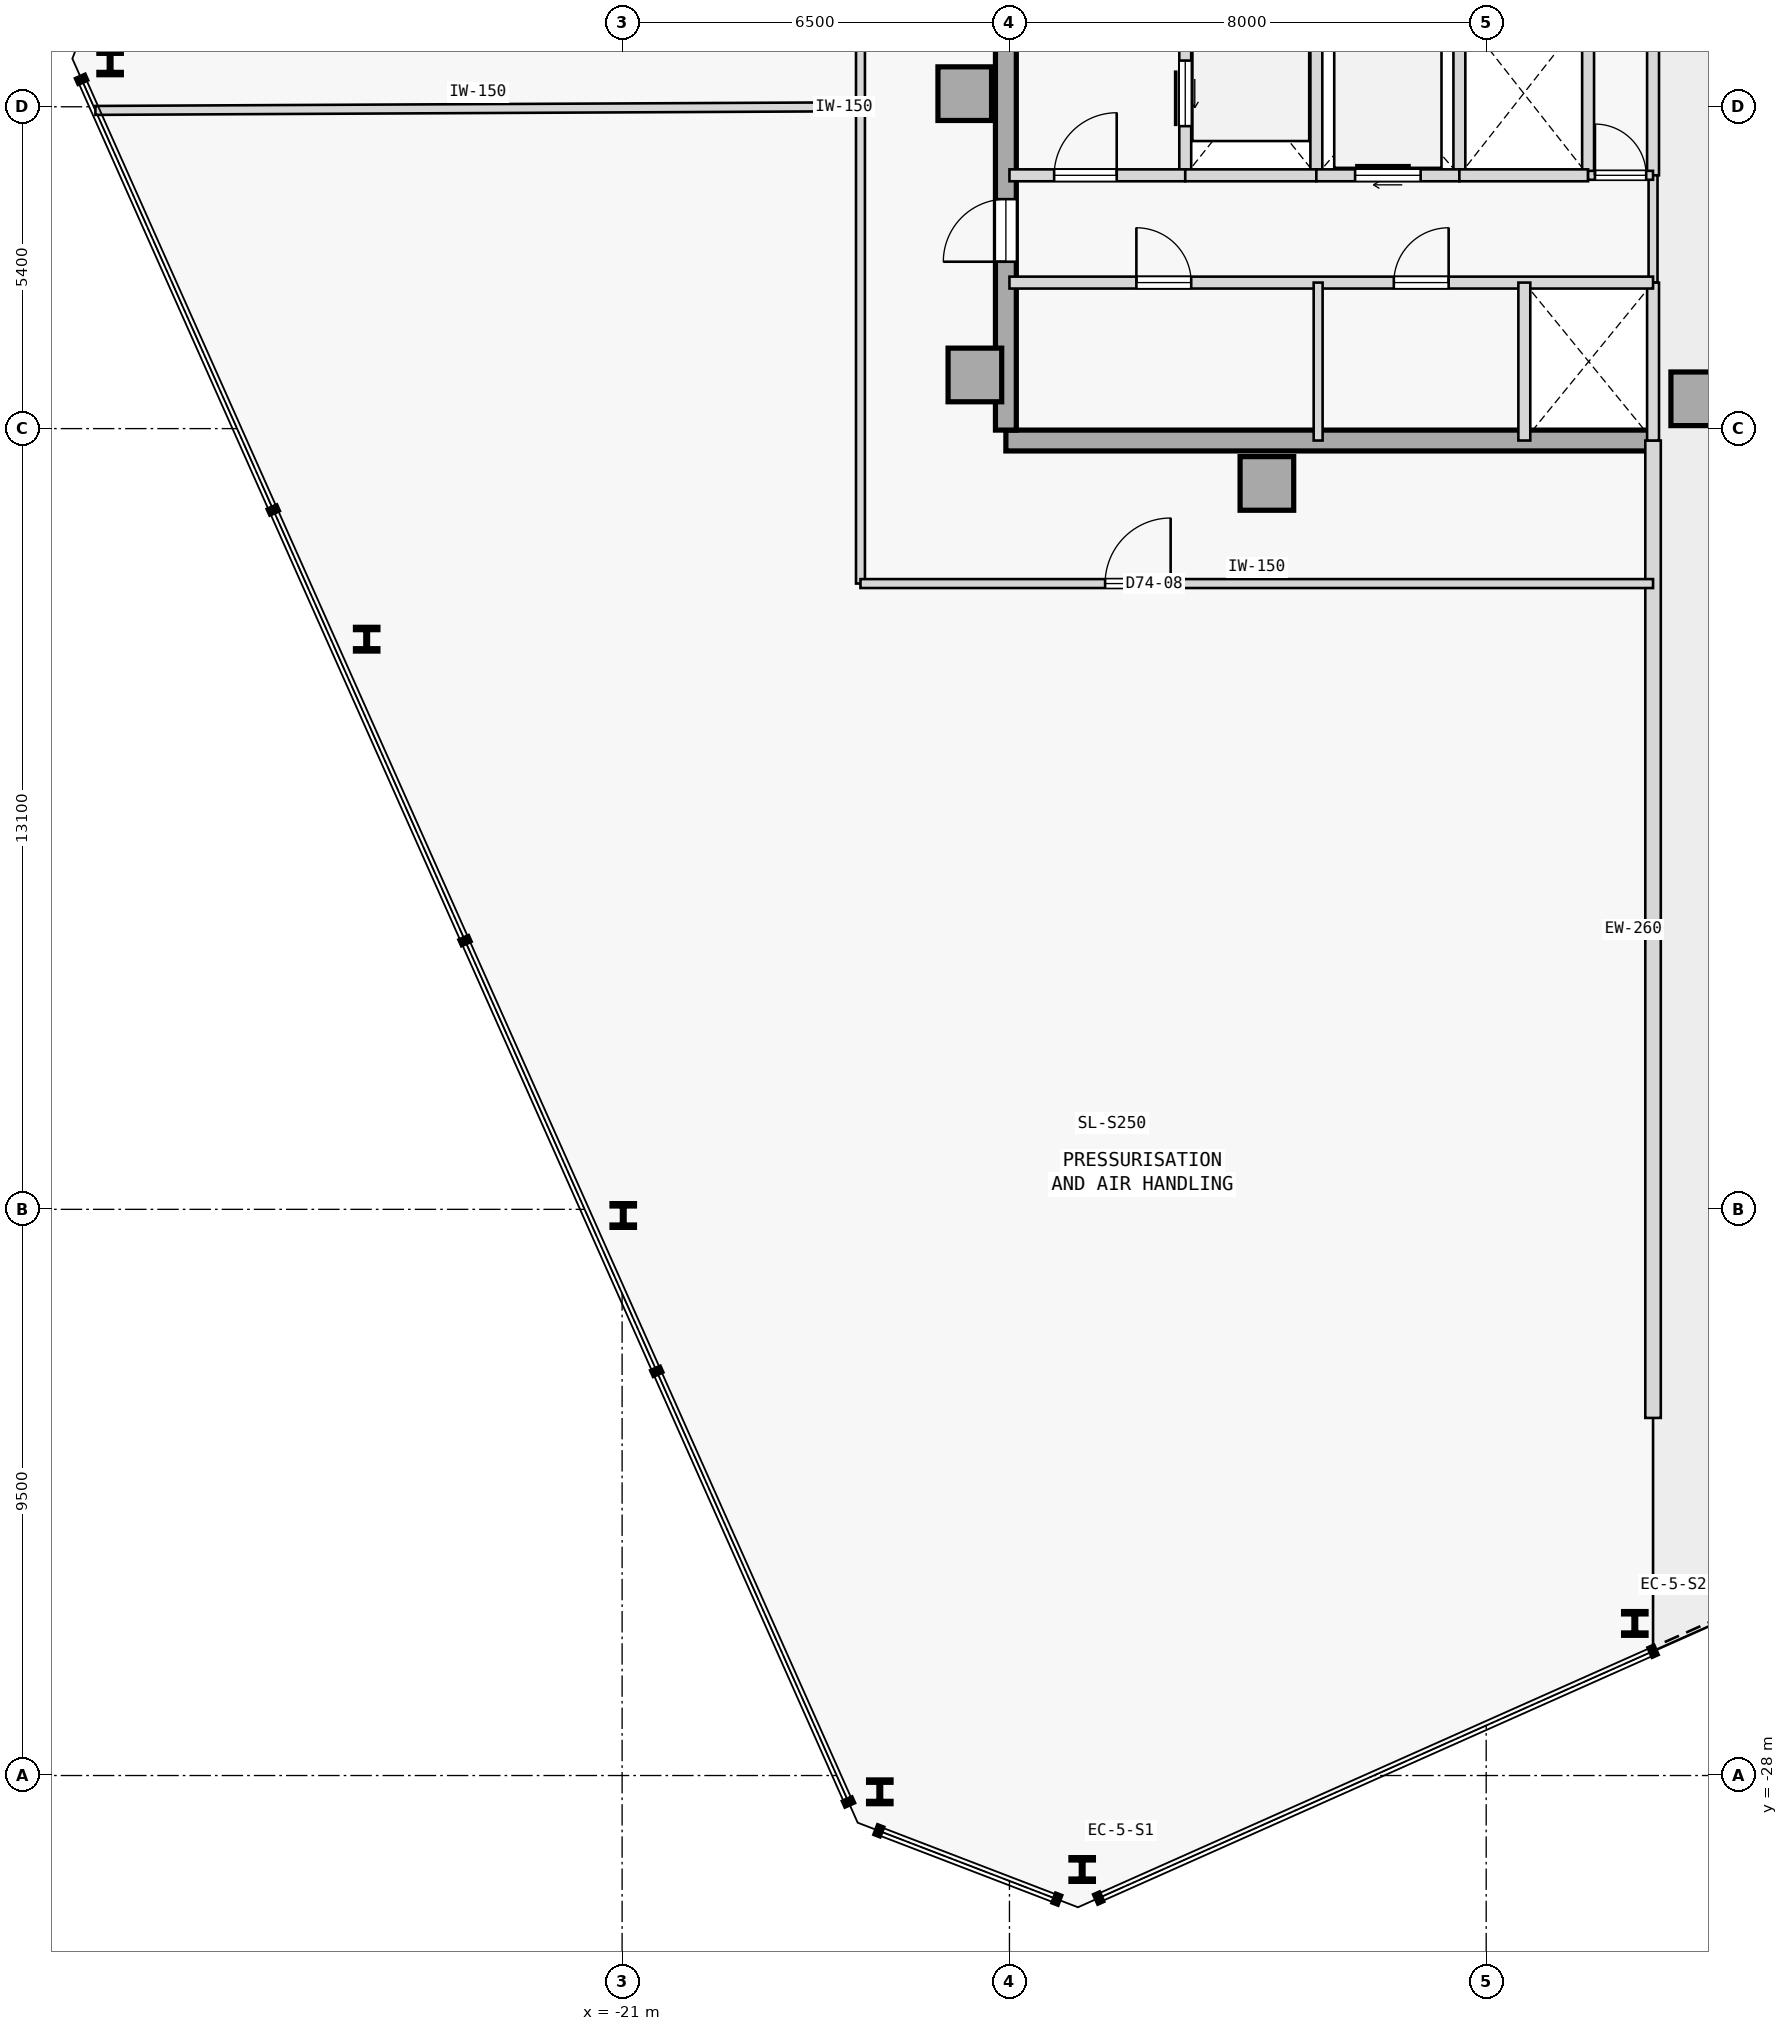
"""IFC4 building model, lengths in metres.
Left out: names, types, materials, properties, quantities, classifications, styles, units other than length and angle.
Written with IfcOpenShell. Run it as: python <this file> out.ifc"""

import sys

from ifc_helpers import new_model, si_unit, direction, frame, frame_2d, origin, origin_2d, place, context, subcontext, project, spatial, rectangle, i_section, extrude, element, fill, save


model = new_model("IFC4")
c1 = context("Model", 3, precision=1e-05, world=origin(), true_north=direction((0.0, 1.0)))
c2 = subcontext(c1, "Body", "Model", "MODEL_VIEW")
j1 = project(units=[si_unit("LENGTHUNIT", "METRE"), si_unit("PLANEANGLEUNIT", "RADIAN")], contexts=[c1])
p1 = place(None, origin())
s1 = spatial("IfcSite", under=j1, at=p1, CompositionType="ELEMENT")
p2 = place(p1, origin())
s2 = spatial("IfcBuilding", under=s1, at=p2, CompositionType="ELEMENT")
p3 = place(p2, frame((0.0, 0.0, 275.6)))
s3 = spatial("IfcBuildingStorey", under=s2, at=p3, CompositionType="ELEMENT", Elevation=275.6)
for number, where, z_axis, x_axis in (
    (1, (-15.25, 0.22, 0.0), (0.0, 0.0, 1.0), (1.0, 0.0, 0.0)),
    (2, (-15.08, -4.5, 0.0), (0.0, 0.0, 1.0), (1.0, 0.0, 0.0)),
    (3, (-10.18, -6.32, 0.0), (0.0, 0.0, 1.0), (1.0, 0.0, 0.0)),
    (4, (-2.95, -4.9, 0.0), (0.0, 0.0, 1.0), (1.0, 0.0, 0.0)),
):
    element("IfcColumn", number, at=place(p3, frame(where, z_axis=z_axis, x_axis=x_axis)), inside=s3, PredefinedType="COLUMN", context=c2, shape_type="SweptSolid", body=[
        extrude(rectangle(XDim=0.9, YDim=0.9, at=origin_2d()), origin(), (0.0, 0.0, 1.0), 6.3),
    ])
p4 = place(p3, frame((-14.56, -5.6, 0.0), z_axis=(0.0, 0.0, 1.0), x_axis=(1.0, 0.0, 0.0)))
e5 = element("IfcWall", 5, at=p4, inside=s3, PredefinedType="SHEAR", context=c2, shape_type="SweptSolid", body=[
    extrude(rectangle(XDim=10.86, YDim=0.35, at=frame_2d((5.43, 0.0))), origin(), (0.0, 0.0, 1.0), 6.075),
])
p5 = place(p3, frame((-14.56, -5.425, 0.0), z_axis=(0.0, 0.0, 1.0), x_axis=(0.0, 1.0, 0.0)))
e6 = element("IfcWall", 6, at=p5, inside=s3, PredefinedType="SHEAR", context=c2, shape_type="SweptSolid", body=[
    extrude(rectangle(XDim=10.85, YDim=0.35, at=frame_2d((5.425, 0.0))), origin(), (0.0, 0.0, 1.0), 6.075),
])
p6 = place(p5, frame((2.825, 0.0, 0.0)))
e7 = element("IfcOpeningElement", 7, at=p6, cuts=e6, PredefinedType="OPENING", context=c2, shape_type="SweptSolid", body=[
    extrude(rectangle(XDim=1.05, YDim=2.15, at=frame_2d((0.525, 1.075))), frame((0.0, 0.185, 0.0), z_axis=(0.0, -1.0, 0.0), x_axis=(1.0, 0.0, 0.0)), (0.0, 0.0, 1.0), 0.37),
])
for number, where, z_axis, x_axis in (
    (8, (-13.28, -29.577, 0.0), (0.0, 0.0, 1.0), (1.0, 0.0, 0.0)),
    (9, (-4.006, -25.448, 0.0), (0.0, 0.0, 1.0), (1.0, 0.0, 0.0)),
    (10, (-29.592, 0.737, 0.0), (0.0, 0.0, 1.0), (1.0, 0.0, 0.0)),
    (11, (-25.286, -8.933, 0.0), (0.0, 0.0, 1.0), (1.0, 0.0, 0.0)),
    (12, (-20.981, -18.603, 0.0), (0.0, 0.0, 1.0), (1.0, 0.0, 0.0)),
    (13, (-16.676, -28.273, 0.0), (0.0, 0.0, 1.0), (1.0, 0.0, 0.0)),
):
    element("IfcColumn", number, at=place(p3, frame(where, z_axis=z_axis, x_axis=x_axis)), inside=s3, PredefinedType="COLUMN", context=c2, shape_type="SweptSolid", body=[
        extrude(i_section(OverallWidth=0.377, OverallDepth=0.399, WebThickness=0.025, FlangeThickness=0.04, FilletRadius=0.015, at=origin_2d()), origin(), (0.0, 0.0, 1.0), 6.3),
    ])
p7 = place(p3, frame((-3.7, -22.0, 0.0), z_axis=(0.0, 0.0, 1.0), x_axis=(0.0, 1.0, 0.0)))
e14 = element("IfcWall", 14, at=p7, inside=s3, PredefinedType="STANDARD", context=c2, shape_type="SweptSolid", body=[
    extrude(rectangle(XDim=16.4, YDim=0.26, at=frame_2d((8.2, 0.0))), origin(), (0.0, 0.0, 1.0), 6.075),
])
p8 = place(p3, frame((-3.7, -1.15, 0.0), z_axis=(0.0, 0.0, 1.0), x_axis=(0.0, 1.0, 0.0)))
e15 = element("IfcWall", 15, at=p8, inside=s3, PredefinedType="STANDARD", context=c2, shape_type="SweptSolid", body=[
    extrude(rectangle(XDim=6.75, YDim=0.2, at=frame_2d((3.375, 0.0))), origin(), (0.0, 0.0, 1.0), 6.075),
])
p9 = place(p3, frame((-3.7, -2.95, 0.0), z_axis=(0.0, 0.0, 1.0), x_axis=(0.0, 1.0, 0.0)))
e16 = element("IfcWall", 16, at=p9, inside=s3, PredefinedType="PARTITIONING", context=c2, shape_type="SweptSolid", body=[
    extrude(rectangle(XDim=1.8, YDim=0.15, at=frame_2d((0.9, 0.0))), origin(), (0.0, 0.0, 1.0), 6.075),
])
p10 = place(p3, frame((-3.7, -5.6, 0.0), z_axis=(0.0, 0.0, 1.0), x_axis=(0.0, 1.0, 0.0)))
e17 = element("IfcWall", 17, at=p10, inside=s3, PredefinedType="STANDARD", context=c2, shape_type="SweptSolid", body=[
    extrude(rectangle(XDim=2.65, YDim=0.2, at=frame_2d((1.325, 0.0))), origin(), (0.0, 0.0, 1.0), 6.075),
])
p11 = place(p3, frame((-11.55, -1.15, 0.0), z_axis=(0.0, 0.0, 1.0), x_axis=(0.0, 1.0, 0.0)))
e18 = element("IfcWall", 18, at=p11, inside=s3, PredefinedType="STANDARD", context=c2, shape_type="SweptSolid", body=[
    extrude(rectangle(XDim=2.75, YDim=0.2, at=frame_2d((1.375, 0.0))), origin(), (0.0, 0.0, 1.0), 6.075),
])
p12 = place(p11, frame((0.825, 0.0, 0.0)))
e19 = element("IfcOpeningElement", 19, at=p12, cuts=e18, PredefinedType="OPENING", context=c2, shape_type="SweptSolid", body=[
    extrude(rectangle(XDim=1.1, YDim=2.15, at=frame_2d((0.55, 1.075))), frame((0.0, 0.11, 0.0), z_axis=(0.0, -1.0, 0.0), x_axis=(1.0, 0.0, 0.0)), (0.0, 0.0, 1.0), 0.22),
])
p13 = place(p3, frame((-9.35, -1.15, 0.0), z_axis=(0.0, 0.0, 1.0), x_axis=(0.0, 1.0, 0.0)))
e20 = element("IfcWall", 20, at=p13, inside=s3, PredefinedType="STANDARD", context=c2, shape_type="SweptSolid", body=[
    extrude(rectangle(XDim=2.75, YDim=0.2, at=frame_2d((1.375, 0.0))), origin(), (0.0, 0.0, 1.0), 6.075),
])
p14 = place(p3, frame((-14.5, -1.15, 0.0), z_axis=(0.0, 0.0, 1.0), x_axis=(1.0, 0.0, 0.0)))
e21 = element("IfcWall", 21, at=p14, inside=s3, PredefinedType="STANDARD", context=c2, shape_type="SweptSolid", body=[
    extrude(rectangle(XDim=2.95, YDim=0.2, at=frame_2d((1.475, 0.0))), origin(), (0.0, 0.0, 1.0), 6.075),
])
p15 = place(p14, frame((0.75, 0.0, 0.0)))
e22 = element("IfcOpeningElement", 22, at=p15, cuts=e21, PredefinedType="OPENING", context=c2, shape_type="SweptSolid", body=[
    extrude(rectangle(XDim=1.05, YDim=2.18, at=frame_2d((0.525, 1.09))), frame((0.0, 0.11, 0.0), z_axis=(0.0, -1.0, 0.0), x_axis=(1.0, 0.0, 0.0)), (0.0, 0.0, 1.0), 0.22),
])
p16 = place(p3, frame((-11.55, -1.15, 0.0), z_axis=(0.0, 0.0, 1.0), x_axis=(1.0, 0.0, 0.0)))
e23 = element("IfcWall", 23, at=p16, inside=s3, PredefinedType="STANDARD", context=c2, shape_type="SweptSolid", body=[
    extrude(rectangle(XDim=2.2, YDim=0.2, at=frame_2d((1.1, 0.0))), origin(), (0.0, 0.0, 1.0), 6.075),
])
p17 = place(p3, frame((-6.95, -1.15, 0.0), z_axis=(0.0, 0.0, 1.0), x_axis=(0.0, 1.0, 0.0)))
e24 = element("IfcWall", 24, at=p17, inside=s3, PredefinedType="STANDARD", context=c2, shape_type="SweptSolid", body=[
    extrude(rectangle(XDim=2.75, YDim=0.2, at=frame_2d((1.375, 0.0))), origin(), (0.0, 0.0, 1.0), 6.075),
])
p18 = place(p3, frame((-9.35, -1.15, 0.0), z_axis=(0.0, 0.0, 1.0), x_axis=(1.0, 0.0, 0.0)))
e25 = element("IfcWall", 25, at=p18, inside=s3, PredefinedType="STANDARD", context=c2, shape_type="SweptSolid", body=[
    extrude(rectangle(XDim=2.4, YDim=0.2, at=frame_2d((1.2, 0.0))), origin(), (0.0, 0.0, 1.0), 6.075),
])
p19 = place(p18, frame((0.65, 0.0, 0.0)))
e26 = element("IfcOpeningElement", 26, at=p19, cuts=e25, PredefinedType="OPENING", context=c2, shape_type="SweptSolid", body=[
    extrude(rectangle(XDim=1.1, YDim=2.15, at=frame_2d((0.55, 1.075))), frame((0.0, 0.11, 0.0), z_axis=(0.0, -1.0, 0.0), x_axis=(1.0, 0.0, 0.0)), (0.0, 0.0, 1.0), 0.22),
])
p20 = place(p3, frame((-4.79, -1.15, 0.0), z_axis=(0.0, 0.0, 1.0), x_axis=(0.0, 1.0, 0.0)))
e27 = element("IfcWall", 27, at=p20, inside=s3, PredefinedType="STANDARD", context=c2, shape_type="SweptSolid", body=[
    extrude(rectangle(XDim=2.75, YDim=0.2, at=frame_2d((1.375, 0.0))), origin(), (0.0, 0.0, 1.0), 6.075),
])
p21 = place(p3, frame((-6.95, -1.15, 0.0), z_axis=(0.0, 0.0, 1.0), x_axis=(1.0, 0.0, 0.0)))
e28 = element("IfcWall", 28, at=p21, inside=s3, PredefinedType="STANDARD", context=c2, shape_type="SweptSolid", body=[
    extrude(rectangle(XDim=2.16, YDim=0.2, at=frame_2d((1.08, 0.0))), origin(), (0.0, 0.0, 1.0), 6.075),
])
p22 = place(p3, frame((-4.79, -1.15, 0.0), z_axis=(0.0, 0.0, 1.0), x_axis=(1.0, 0.0, 0.0)))
e29 = element("IfcWall", 29, at=p22, inside=s3, PredefinedType="PARTITIONING", context=c2, shape_type="SweptSolid", body=[
    extrude(rectangle(XDim=1.09, YDim=0.15, at=frame_2d((0.545, 0.0))), origin(), (0.0, 0.0, 1.0), 6.075),
])
p23 = place(p22, frame((0.115, 0.0, 0.0)))
e30 = element("IfcOpeningElement", 30, at=p23, cuts=e29, PredefinedType="OPENING", context=c2, shape_type="SweptSolid", body=[
    extrude(rectangle(XDim=0.86, YDim=2.15, at=frame_2d((0.43, 1.075))), frame((0.0, 0.085, 0.0), z_axis=(0.0, -1.0, 0.0), x_axis=(1.0, 0.0, 0.0)), (0.0, 0.0, 1.0), 0.17),
])
p24 = place(p3, frame((-14.5, -2.95, 0.0), z_axis=(0.0, 0.0, 1.0), x_axis=(1.0, 0.0, 0.0)))
e31 = element("IfcWall", 31, at=p24, inside=s3, PredefinedType="STANDARD", context=c2, shape_type="SweptSolid", body=[
    extrude(rectangle(XDim=10.8, YDim=0.2, at=frame_2d((5.4, 0.0))), origin(), (0.0, 0.0, 1.0), 6.075),
])
p25 = place(p24, frame((2.13, 0.0, 0.0)))
e32 = element("IfcOpeningElement", 32, at=p25, cuts=e31, PredefinedType="OPENING", context=c2, shape_type="SweptSolid", body=[
    extrude(rectangle(XDim=0.92, YDim=2.15, at=frame_2d((0.46, 1.075))), frame((0.0, 0.11, 0.0), z_axis=(0.0, -1.0, 0.0), x_axis=(1.0, 0.0, 0.0)), (0.0, 0.0, 1.0), 0.22),
])
p26 = place(p24, frame((6.45, 0.0, 0.0)))
e33 = element("IfcOpeningElement", 33, at=p26, cuts=e31, PredefinedType="OPENING", context=c2, shape_type="SweptSolid", body=[
    extrude(rectangle(XDim=0.92, YDim=2.15, at=frame_2d((0.46, 1.075))), frame((0.0, 0.11, 0.0), z_axis=(0.0, -1.0, 0.0), x_axis=(1.0, 0.0, 0.0)), (0.0, 0.0, 1.0), 0.22),
])
p27 = place(p3, frame((-5.86, -5.6, 0.0), z_axis=(0.0, 0.0, 1.0), x_axis=(0.0, 1.0, 0.0)))
e34 = element("IfcWall", 34, at=p27, inside=s3, PredefinedType="STANDARD", context=c2, shape_type="SweptSolid", body=[
    extrude(rectangle(XDim=2.65, YDim=0.2, at=frame_2d((1.325, 0.0))), origin(), (0.0, 0.0, 1.0), 6.075),
])
p28 = place(p3, frame((-9.32, -5.6, 0.0), z_axis=(0.0, 0.0, 1.0), x_axis=(0.0, 1.0, 0.0)))
e35 = element("IfcWall", 35, at=p28, inside=s3, PredefinedType="PARTITIONING", context=c2, shape_type="SweptSolid", body=[
    extrude(rectangle(XDim=2.65, YDim=0.15, at=frame_2d((1.325, 0.0))), origin(), (0.0, 0.0, 1.0), 6.075),
])
for number, where, z_axis, x_axis in (
    (36, (-17.0, 0.0, 0.0), (0.0, 0.0, 1.0), (0.0, 1.0, 0.0)),
    (37, (-17.0, -8.0, 0.0), (0.0, 0.0, 1.0), (0.0, 1.0, 0.0)),
):
    element("IfcWall", number, at=place(p3, frame(where, z_axis=z_axis, x_axis=x_axis)), inside=s3, PredefinedType="PARTITIONING", context=c2, shape_type="SweptSolid", body=[
        extrude(rectangle(XDim=8.0, YDim=0.15, at=frame_2d((4.0, 0.0))), origin(), (0.0, 0.0, 1.0), 6.075),
    ])
p29 = place(p3, frame((-17.0, -8.0, 0.0), z_axis=(0.0, 0.0, 1.0), x_axis=(1.0, 0.0, 0.0)))
e38 = element("IfcWall", 38, at=p29, inside=s3, PredefinedType="PARTITIONING", context=c2, shape_type="SweptSolid", body=[
    extrude(rectangle(XDim=13.3, YDim=0.15, at=frame_2d((6.65, 0.0))), origin(), (0.0, 0.0, 1.0), 6.075),
])
p30 = place(p29, frame((4.105, 0.0, 0.0)))
e39 = element("IfcOpeningElement", 39, at=p30, cuts=e38, PredefinedType="OPENING", context=c2, shape_type="SweptSolid", body=[
    extrude(rectangle(XDim=1.1, YDim=2.15, at=frame_2d((0.55, 1.075))), frame((0.0, 0.085, 0.0), z_axis=(0.0, -1.0, 0.0), x_axis=(1.0, 0.0, 0.0)), (0.0, 0.0, 1.0), 0.17),
])
p31 = place(p3, frame((-29.838, -0.061, 0.0), z_axis=(0.0, 0.0, 1.0), x_axis=(0.999988608793, 0.004773079162, 0.0)))
e40 = element("IfcWall", 40, at=p31, inside=s3, PredefinedType="PARTITIONING", context=c2, shape_type="SweptSolid", body=[
    extrude(rectangle(XDim=12.839, YDim=0.15, at=frame_2d((6.419, 0.0))), origin(), (0.0, 0.0, 1.0), 6.075),
])
p32 = place(p15, origin())
e41 = element("IfcDoor", 41, at=p32, inside=s3, OperationType="SINGLE_SWING_RIGHT", PredefinedType="DOOR", context=c2, shape_type="SweptSolid", body=[
    extrude(rectangle(XDim=1.05, YDim=2.18, at=frame_2d((0.525, 1.09))), frame((0.0, 0.025, 0.0), z_axis=(0.0, -1.0, 0.0), x_axis=(1.0, 0.0, 0.0)), (0.0, 0.0, 1.0), 0.05),
])
fill(e22, e41)
p33 = place(p12, origin())
e42 = element("IfcDoor", 42, at=p33, inside=s3, OperationType="SLIDING_TO_RIGHT", PredefinedType="DOOR", context=c2, shape_type="SweptSolid", body=[
    extrude(rectangle(XDim=1.1, YDim=2.15, at=frame_2d((0.55, 1.075))), frame((0.0, 0.025, 0.0), z_axis=(0.0, -1.0, 0.0), x_axis=(1.0, 0.0, 0.0)), (0.0, 0.0, 1.0), 0.05),
])
fill(e19, e42)
p34 = place(p19, origin())
e43 = element("IfcDoor", 43, at=p34, inside=s3, OperationType="SLIDING_TO_RIGHT", PredefinedType="DOOR", context=c2, shape_type="SweptSolid", body=[
    extrude(rectangle(XDim=1.1, YDim=2.15, at=frame_2d((0.55, 1.075))), frame((0.0, 0.025, 0.0), z_axis=(0.0, -1.0, 0.0), x_axis=(1.0, 0.0, 0.0)), (0.0, 0.0, 1.0), 0.05),
])
fill(e26, e43)
p35 = place(p25, origin())
e44 = element("IfcDoor", 44, at=p35, inside=s3, OperationType="SINGLE_SWING_LEFT", PredefinedType="DOOR", context=c2, shape_type="SweptSolid", body=[
    extrude(rectangle(XDim=0.92, YDim=2.15, at=frame_2d((0.46, 1.075))), frame((0.0, 0.025, 0.0), z_axis=(0.0, -1.0, 0.0), x_axis=(1.0, 0.0, 0.0)), (0.0, 0.0, 1.0), 0.05),
])
fill(e32, e44)
p36 = place(p26, origin())
e45 = element("IfcDoor", 45, at=p36, inside=s3, OperationType="SINGLE_SWING_RIGHT", PredefinedType="DOOR", context=c2, shape_type="SweptSolid", body=[
    extrude(rectangle(XDim=0.92, YDim=2.15, at=frame_2d((0.46, 1.075))), frame((0.0, 0.025, 0.0), z_axis=(0.0, -1.0, 0.0), x_axis=(1.0, 0.0, 0.0)), (0.0, 0.0, 1.0), 0.05),
])
fill(e33, e45)
p37 = place(p23, origin())
e46 = element("IfcDoor", 46, at=p37, inside=s3, OperationType="SINGLE_SWING_LEFT", PredefinedType="DOOR", context=c2, shape_type="SweptSolid", body=[
    extrude(rectangle(XDim=0.86, YDim=2.15, at=frame_2d((0.43, 1.075))), frame((0.0, 0.025, 0.0), z_axis=(0.0, -1.0, 0.0), x_axis=(1.0, 0.0, 0.0)), (0.0, 0.0, 1.0), 0.05),
])
fill(e30, e46)
p38 = place(p30, origin())
e47 = element("IfcDoor", 47, at=p38, inside=s3, OperationType="SINGLE_SWING_RIGHT", PredefinedType="DOOR", context=c2, shape_type="SweptSolid", body=[
    extrude(rectangle(XDim=1.1, YDim=2.15, at=frame_2d((0.55, 1.075))), frame((0.0, 0.025, 0.0), z_axis=(0.0, -1.0, 0.0), x_axis=(1.0, 0.0, 0.0)), (0.0, 0.0, 1.0), 0.05),
])
fill(e39, e47)
p39 = place(p6, origin())
e48 = element("IfcDoor", 48, at=p39, inside=s3, OperationType="SINGLE_SWING_LEFT", PredefinedType="DOOR", context=c2, shape_type="SweptSolid", body=[
    extrude(rectangle(XDim=1.05, YDim=2.15, at=frame_2d((0.525, 1.075))), frame((0.0, 0.025, 0.0), z_axis=(0.0, -1.0, 0.0), x_axis=(1.0, 0.0, 0.0)), (0.0, 0.0, 1.0), 0.05),
])
fill(e7, e48)
save(model, sys.argv[1])
